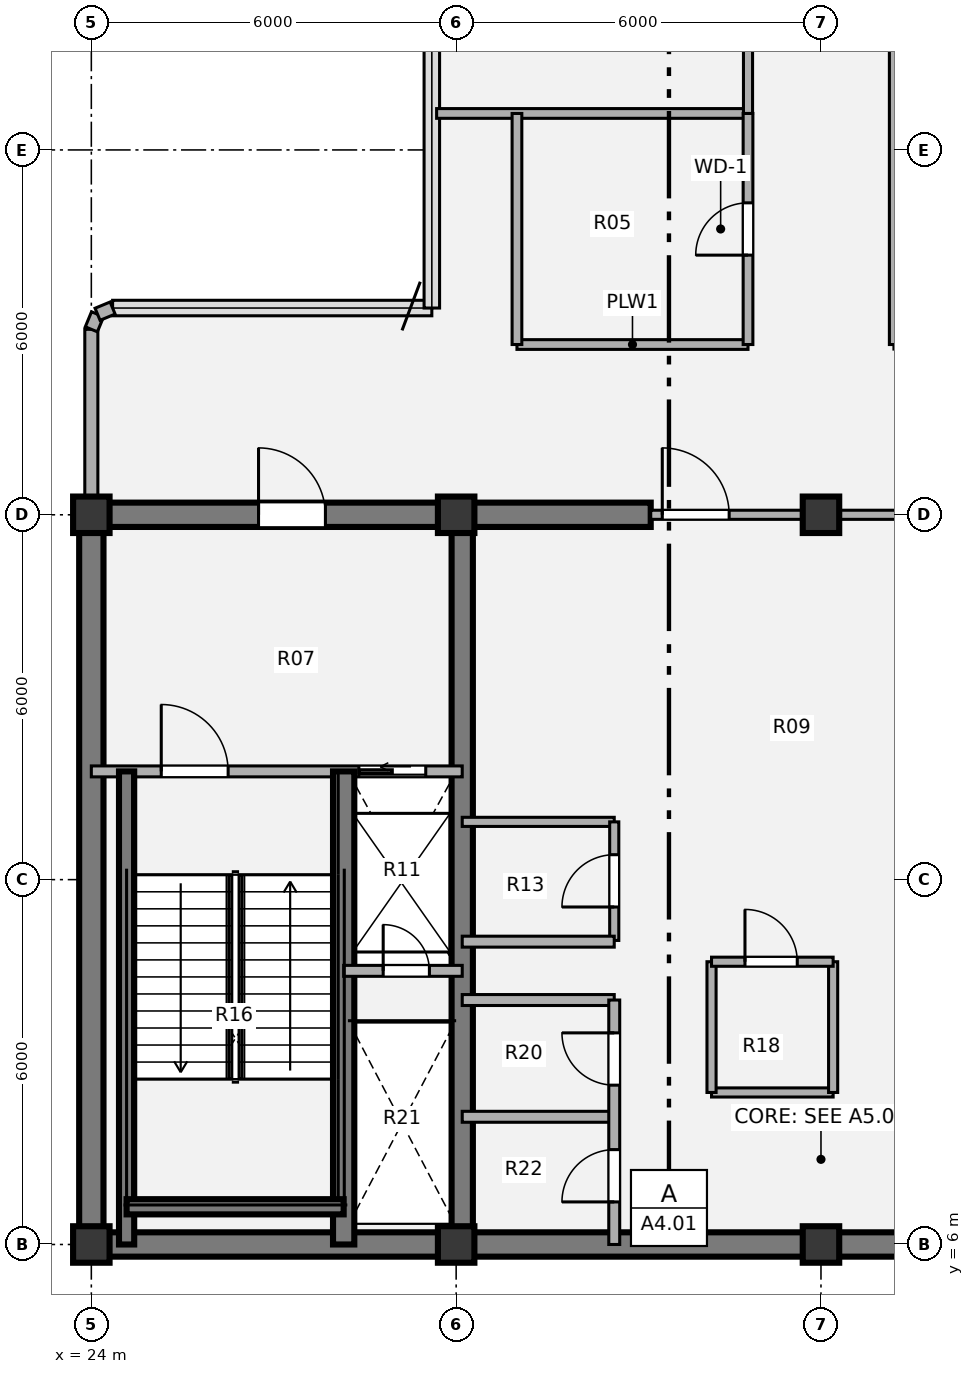
"""IFC4 building model, lengths in metres.
Left out: names, types, materials, properties, quantities, classifications, styles, units other than length and angle.
Written with IfcOpenShell. Run it as: python <this file> out.ifc"""

import sys

from ifc_helpers import new_model, si_unit, direction, frame, frame_2d, origin, origin_2d, place, context, subcontext, project, spatial, rectangle, extrude, source, transform, mapped, element, fill, save


model = new_model("IFC4")
c1 = context("Model", 3, precision=1e-05, world=origin(), true_north=direction((0.0, 1.0)))
c2 = subcontext(c1, "Body", "Model", "MODEL_VIEW")
j1 = project(units=[si_unit("LENGTHUNIT", "METRE"), si_unit("PLANEANGLEUNIT", "RADIAN")], contexts=[c1])
p1 = place(None, origin())
s1 = spatial("IfcSite", under=j1, at=p1, CompositionType="ELEMENT")
p2 = place(p1, origin())
s2 = spatial("IfcBuilding", under=s1, at=p2, CompositionType="ELEMENT")
p3 = place(p2, frame((0.0, 0.0, 291.06)))
s3 = spatial("IfcBuildingStorey", under=s2, at=p3, CompositionType="ELEMENT", Elevation=291.06)
m1 = source(origin(), c2, "Body", "SweptSolid", [
    extrude(rectangle(XDim=0.6, YDim=0.6, at=origin_2d()), origin(), (0.0, 0.0, 1.0), 4.86),
])
for number, where, z_axis, x_axis in (
    (1, (24.0, 6.0, 0.0), (0.0, 0.0, 1.0), (1.0, 0.0, 0.0)),
    (2, (30.0, 6.0, 0.0), (0.0, 0.0, 1.0), (1.0, 0.0, 0.0)),
    (3, (36.0, 6.0, 0.0), (0.0, 0.0, 1.0), (1.0, 0.0, 0.0)),
    (4, (24.0, 18.0, 0.0), (0.0, 0.0, 1.0), (1.0, 0.0, 0.0)),
    (5, (30.0, 18.0, 0.0), (0.0, 0.0, 1.0), (1.0, 0.0, 0.0)),
    (6, (36.0, 18.0, 0.0), (0.0, 0.0, 1.0), (1.0, 0.0, 0.0)),
):
    element("IfcColumn", number, at=place(p3, frame(where, z_axis=z_axis, x_axis=x_axis)), inside=s3, PredefinedType="COLUMN", context=c2, shape_type="MappedRepresentation", body=[
        mapped(m1, transform((0.0, 0.0, 0.0), x_axis=(1.0, 0.0, 0.0), y_axis=(0.0, 1.0, 0.0), z_axis=(0.0, 0.0, 1.0), scale=1.0)),
    ])
p4 = place(p3, frame((48.2, 6.0, 0.0), z_axis=(0.0, 0.0, 1.0), x_axis=(-1.0, 0.0, 0.0)))
e7 = element("IfcWall", 7, at=p4, inside=s3, PredefinedType="SHEAR", context=c2, shape_type="SweptSolid", body=[
    extrude(rectangle(XDim=24.4, YDim=0.4, at=frame_2d((12.2, 0.0))), origin(), (0.0, 0.0, 1.0), 4.86),
])
p5 = place(p3, frame((24.0, 6.0, 0.0), z_axis=(0.0, 0.0, 1.0), x_axis=(0.0, 1.0, 0.0)))
e8 = element("IfcWall", 8, at=p5, inside=s3, PredefinedType="SHEAR", context=c2, shape_type="SweptSolid", body=[
    extrude(rectangle(XDim=12.0, YDim=0.4, at=frame_2d((6.0, 0.0))), origin(), (0.0, 0.0, 1.0), 4.86),
])
p6 = place(p3, frame((23.8, 18.0, 0.0), z_axis=(0.0, 0.0, 1.0), x_axis=(1.0, 0.0, 0.0)))
e9 = element("IfcWall", 9, at=p6, inside=s3, PredefinedType="SHEAR", context=c2, shape_type="SweptSolid", body=[
    extrude(rectangle(XDim=9.4, YDim=0.4, at=frame_2d((4.7, 0.0))), origin(), (0.0, 0.0, 1.0), 4.86),
])
p7 = place(p6, frame((2.95, 0.0, 0.0)))
e10 = element("IfcOpeningElement", 10, at=p7, cuts=e9, PredefinedType="OPENING", context=c2, shape_type="SweptSolid", body=[
    extrude(rectangle(XDim=1.1, YDim=2.1, at=origin_2d()), frame((0.55, 0.21, 1.05), z_axis=(0.0, -1.0, 0.0), x_axis=(1.0, 0.0, 0.0)), (0.0, 0.0, 1.0), 0.42),
])
p8 = place(p3, frame((30.1, 6.0, 0.0), z_axis=(0.0, 0.0, 1.0), x_axis=(0.0, 1.0, 0.0)))
e11 = element("IfcWall", 11, at=p8, inside=s3, PredefinedType="SHEAR", context=c2, shape_type="SweptSolid", body=[
    extrude(rectangle(XDim=12.0, YDim=0.35, at=frame_2d((6.0, 0.0))), origin(), (0.0, 0.0, 1.0), 4.86),
])
p9 = place(p3, frame((24.0, 18.28, 0.0), z_axis=(0.0, 0.0, 1.0), x_axis=(0.0, 1.0, 0.0)))
e12 = element("IfcWall", 12, at=p9, inside=s3, PredefinedType="SOLIDWALL", context=c2, shape_type="SweptSolid", body=[
    extrude(rectangle(XDim=2.77, YDim=0.215, at=frame_2d((1.385, 0.0))), origin(), (0.0, 0.0, 1.0), 2.798),
])
p10 = place(p3, frame((24.0, 21.05, 0.0), z_axis=(0.0, 0.0, 1.0), x_axis=(0.382673670509, 0.923883575944, 0.0)))
e13 = element("IfcWall", 13, at=p10, inside=s3, PredefinedType="SOLIDWALL", context=c2, shape_type="SweptSolid", body=[
    extrude(rectangle(XDim=0.268, YDim=0.215, at=frame_2d((0.134, 0.0))), origin(), (0.0, 0.0, 1.0), 4.61),
])
p11 = place(p3, frame((24.103, 21.298, 0.0), z_axis=(0.0, 0.0, 1.0), x_axis=(0.924205486139, 0.381895560841, 0.0)))
e14 = element("IfcWall", 14, at=p11, inside=s3, PredefinedType="SOLIDWALL", context=c2, shape_type="SweptSolid", body=[
    extrude(rectangle(XDim=0.268, YDim=0.215, at=frame_2d((0.134, 0.0))), origin(), (0.0, 0.0, 1.0), 4.61),
])
p12 = place(p3, frame((30.1, 12.95, 0.0), z_axis=(0.0, 0.0, 1.0), x_axis=(1.0, 0.0, 0.0)))
e15 = element("IfcWall", 15, at=p12, inside=s3, PredefinedType="PARTITIONING", context=c2, shape_type="SweptSolid", body=[
    extrude(rectangle(XDim=2.5, YDim=0.15, at=frame_2d((1.25, 0.0))), origin(), (0.0, 0.0, 1.0), 4.58),
])
p13 = place(p3, frame((32.6, 11.0, 0.0), z_axis=(0.0, 0.0, 1.0), x_axis=(0.0, 1.0, 0.0)))
e16 = element("IfcWall", 16, at=p13, inside=s3, PredefinedType="PARTITIONING", context=c2, shape_type="SweptSolid", body=[
    extrude(rectangle(XDim=1.95, YDim=0.15, at=frame_2d((0.975, 0.0))), origin(), (0.0, 0.0, 1.0), 4.58),
])
p14 = place(p13, frame((0.55, 0.0, 0.0)))
e17 = element("IfcOpeningElement", 17, at=p14, cuts=e16, PredefinedType="OPENING", context=c2, shape_type="SweptSolid", body=[
    extrude(rectangle(XDim=0.86, YDim=2.1, at=origin_2d()), frame((0.43, 0.085, 1.05), z_axis=(0.0, -1.0, 0.0), x_axis=(1.0, 0.0, 0.0)), (0.0, 0.0, 1.0), 0.17),
])
p15 = place(p3, frame((34.2, 8.5, 0.0), z_axis=(0.0, 0.0, 1.0), x_axis=(1.0, 0.0, 0.0)))
e18 = element("IfcWall", 18, at=p15, inside=s3, PredefinedType="PARTITIONING", context=c2, shape_type="SweptSolid", body=[
    extrude(rectangle(XDim=2.0, YDim=0.15, at=frame_2d((1.0, 0.0))), origin(), (0.0, 0.0, 1.0), 4.58),
])
p16 = place(p3, frame((34.2, 8.5, 0.0), z_axis=(0.0, 0.0, 1.0), x_axis=(0.0, 1.0, 0.0)))
e19 = element("IfcWall", 19, at=p16, inside=s3, PredefinedType="PARTITIONING", context=c2, shape_type="SweptSolid", body=[
    extrude(rectangle(XDim=2.15, YDim=0.15, at=frame_2d((1.075, 0.0))), origin(), (0.0, 0.0, 1.0), 4.58),
])
p17 = place(p3, frame((36.2, 8.5, 0.0), z_axis=(0.0, 0.0, 1.0), x_axis=(0.0, 1.0, 0.0)))
e20 = element("IfcWall", 20, at=p17, inside=s3, PredefinedType="PARTITIONING", context=c2, shape_type="SweptSolid", body=[
    extrude(rectangle(XDim=2.15, YDim=0.15, at=frame_2d((1.075, 0.0))), origin(), (0.0, 0.0, 1.0), 3.795),
])
p18 = place(p3, frame((34.2, 10.65, 0.0), z_axis=(0.0, 0.0, 1.0), x_axis=(1.0, 0.0, 0.0)))
e21 = element("IfcWall", 21, at=p18, inside=s3, PredefinedType="PARTITIONING", context=c2, shape_type="SweptSolid", body=[
    extrude(rectangle(XDim=2.0, YDim=0.15, at=frame_2d((1.0, 0.0))), origin(), (0.0, 0.0, 1.0), 4.58),
])
p19 = place(p18, frame((0.55, 0.0, 0.0)))
e22 = element("IfcOpeningElement", 22, at=p19, cuts=e21, PredefinedType="OPENING", context=c2, shape_type="SweptSolid", body=[
    extrude(rectangle(XDim=0.86, YDim=2.1, at=origin_2d()), frame((0.43, 0.085, 1.05), z_axis=(0.0, -1.0, 0.0), x_axis=(1.0, 0.0, 0.0)), (0.0, 0.0, 1.0), 0.17),
])
for number, where, z_axis, x_axis in (
    (23, (30.1, 10.98, 0.0), (0.0, 0.0, 1.0), (1.0, 0.0, 0.0)),
    (24, (30.1, 8.1, 0.0), (0.0, 0.0, 1.0), (1.0, 0.0, 0.0)),
    (25, (30.1, 10.02, 0.0), (0.0, 0.0, 1.0), (1.0, 0.0, 0.0)),
):
    element("IfcWall", number, at=place(p3, frame(where, z_axis=z_axis, x_axis=x_axis)), inside=s3, PredefinedType="PARTITIONING", context=c2, shape_type="SweptSolid", body=[
        extrude(rectangle(XDim=2.5, YDim=0.18, at=frame_2d((1.25, 0.0))), origin(), (0.0, 0.0, 1.0), 4.58),
    ])
p20 = place(p3, frame((32.6, 6.0, 0.0), z_axis=(0.0, 0.0, 1.0), x_axis=(0.0, 1.0, 0.0)))
e26 = element("IfcWall", 26, at=p20, inside=s3, PredefinedType="PARTITIONING", context=c2, shape_type="SweptSolid", body=[
    extrude(rectangle(XDim=4.02, YDim=0.18, at=frame_2d((2.01, 0.0))), origin(), (0.0, 0.0, 1.0), 4.58),
])
p21 = place(p20, frame((0.7, 0.0, 0.0)))
e27 = element("IfcOpeningElement", 27, at=p21, cuts=e26, PredefinedType="OPENING", context=c2, shape_type="SweptSolid", body=[
    extrude(rectangle(XDim=0.86, YDim=2.1, at=origin_2d()), frame((0.43, 0.1, 1.05), z_axis=(0.0, -1.0, 0.0), x_axis=(1.0, 0.0, 0.0)), (0.0, 0.0, 1.0), 0.2),
])
p22 = place(p20, frame((2.62, 0.0, 0.0)))
e28 = element("IfcOpeningElement", 28, at=p22, cuts=e26, PredefinedType="OPENING", context=c2, shape_type="SweptSolid", body=[
    extrude(rectangle(XDim=0.86, YDim=2.1, at=origin_2d()), frame((0.43, 0.1, 1.05), z_axis=(0.0, -1.0, 0.0), x_axis=(1.0, 0.0, 0.0)), (0.0, 0.0, 1.0), 0.2),
])
p23 = place(p3, frame((33.2, 18.0, 0.0), z_axis=(0.0, 0.0, 1.0), x_axis=(1.0, 0.0, 0.0)))
e29 = element("IfcWall", 29, at=p23, inside=s3, PredefinedType="PARTITIONING", context=c2, shape_type="SweptSolid", body=[
    extrude(rectangle(XDim=5.6, YDim=0.15, at=frame_2d((2.8, 0.0))), origin(), (0.0, 0.0, 1.0), 3.595),
])
p24 = place(p23, frame((0.19, 0.0, 0.0)))
e30 = element("IfcOpeningElement", 30, at=p24, cuts=e29, PredefinedType="OPENING", context=c2, shape_type="SweptSolid", body=[
    extrude(rectangle(XDim=1.1, YDim=2.1, at=origin_2d()), frame((0.55, 0.085, 1.05), z_axis=(0.0, -1.0, 0.0), x_axis=(1.0, 0.0, 0.0)), (0.0, 0.0, 1.0), 0.17),
])
p25 = place(p23, frame((4.31, 0.0, 0.0)))
e31 = element("IfcOpeningElement", 31, at=p25, cuts=e29, PredefinedType="OPENING", context=c2, shape_type="SweptSolid", body=[
    extrude(rectangle(XDim=1.1, YDim=2.1, at=origin_2d()), frame((0.55, 0.085, 1.05), z_axis=(0.0, -1.0, 0.0), x_axis=(1.0, 0.0, 0.0)), (0.0, 0.0, 1.0), 0.17),
])
p26 = place(p3, frame((24.0, 13.78, 0.0), z_axis=(0.0, 0.0, 1.0), x_axis=(1.0, 0.0, 0.0)))
e32 = element("IfcWall", 32, at=p26, inside=s3, PredefinedType="PARTITIONING", context=c2, shape_type="SweptSolid", body=[
    extrude(rectangle(XDim=6.1, YDim=0.18, at=frame_2d((3.05, 0.0))), origin(), (0.0, 0.0, 1.0), 4.58),
])
p27 = place(p26, frame((1.15, 0.0, 0.0)))
e33 = element("IfcOpeningElement", 33, at=p27, cuts=e32, PredefinedType="OPENING", context=c2, shape_type="SweptSolid", body=[
    extrude(rectangle(XDim=1.1, YDim=2.1, at=origin_2d()), frame((0.55, 0.1, 1.05), z_axis=(0.0, -1.0, 0.0), x_axis=(1.0, 0.0, 0.0)), (0.0, 0.0, 1.0), 0.2),
])
p28 = place(p26, frame((4.4, 0.0, 0.0)))
e34 = element("IfcOpeningElement", 34, at=p28, cuts=e32, PredefinedType="OPENING", context=c2, shape_type="SweptSolid", body=[
    extrude(rectangle(XDim=1.1, YDim=2.1, at=origin_2d()), frame((0.55, 0.1, 1.05), z_axis=(0.0, -1.0, 0.0), x_axis=(1.0, 0.0, 0.0)), (0.0, 0.0, 1.0), 0.2),
])
p29 = place(p3, frame((28.15, 6.0, 0.0), z_axis=(0.0, 0.0, 1.0), x_axis=(0.0, 1.0, 0.0)))
e35 = element("IfcWall", 35, at=p29, inside=s3, PredefinedType="SHEAR", context=c2, shape_type="SweptSolid", body=[
    extrude(rectangle(XDim=7.78, YDim=0.35, at=frame_2d((3.89, 0.0))), origin(), (0.0, 0.0, 1.0), 4.93),
])
p30 = place(p3, frame((24.58, 6.0, 0.0), z_axis=(0.0, 0.0, 1.0), x_axis=(0.0, 1.0, 0.0)))
e36 = element("IfcWall", 36, at=p30, inside=s3, PredefinedType="SHEAR", context=c2, shape_type="SweptSolid", body=[
    extrude(rectangle(XDim=7.78, YDim=0.25, at=frame_2d((3.89, 0.0))), origin(), (0.0, 0.0, 1.0), 4.93),
])
p31 = place(p3, frame((24.58, 6.62, 0.0), z_axis=(0.0, 0.0, 1.0), x_axis=(1.0, 0.0, 0.0)))
e37 = element("IfcWall", 37, at=p31, inside=s3, PredefinedType="SHEAR", context=c2, shape_type="SweptSolid", body=[
    extrude(rectangle(XDim=3.57, YDim=0.25, at=frame_2d((1.785, 0.0))), origin(), (0.0, 0.0, 1.0), 4.93),
])
p32 = place(p3, frame((28.15, 10.5, 0.0), z_axis=(0.0, 0.0, 1.0), x_axis=(1.0, 0.0, 0.0)))
e38 = element("IfcWall", 38, at=p32, inside=s3, PredefinedType="PARTITIONING", context=c2, shape_type="SweptSolid", body=[
    extrude(rectangle(XDim=1.95, YDim=0.18, at=frame_2d((0.975, 0.0))), origin(), (0.0, 0.0, 1.0), 4.58),
])
p33 = place(p32, frame((0.65, 0.0, 0.0)))
e39 = element("IfcOpeningElement", 39, at=p33, cuts=e38, PredefinedType="OPENING", context=c2, shape_type="SweptSolid", body=[
    extrude(rectangle(XDim=0.76, YDim=2.05, at=origin_2d()), frame((0.38, 0.1, 1.025), z_axis=(0.0, -1.0, 0.0), x_axis=(1.0, 0.0, 0.0)), (0.0, 0.0, 1.0), 0.2),
])
p34 = place(p3, frame((31.0, 20.8, 0.0), z_axis=(0.0, 0.0, 1.0), x_axis=(1.0, 0.0, 0.0)))
e40 = element("IfcWall", 40, at=p34, inside=s3, PredefinedType="PLUMBINGWALL", context=c2, shape_type="SweptSolid", body=[
    extrude(rectangle(XDim=3.8, YDim=0.16, at=frame_2d((1.9, 0.0))), origin(), (0.0, 0.0, 1.0), 4.58),
])
p35 = place(p3, frame((29.679, 24.6, 0.0), z_axis=(0.0, 0.0, 1.0), x_axis=(1.0, 0.0, 0.0)))
e41 = element("IfcWall", 41, at=p35, inside=s3, PredefinedType="PLUMBINGWALL", context=c2, shape_type="SweptSolid", body=[
    extrude(rectangle(XDim=5.121, YDim=0.16, at=frame_2d((2.561, 0.0))), origin(), (0.0, 0.0, 1.0), 4.58),
])
p36 = place(p3, frame((31.0, 20.8, 0.0), z_axis=(0.0, 0.0, 1.0), x_axis=(0.0, 1.0, 0.0)))
e42 = element("IfcWall", 42, at=p36, inside=s3, PredefinedType="PLUMBINGWALL", context=c2, shape_type="SweptSolid", body=[
    extrude(rectangle(XDim=3.8, YDim=0.16, at=frame_2d((1.9, 0.0))), origin(), (0.0, 0.0, 1.0), 4.58),
])
p37 = place(p3, frame((34.8, 20.8, 0.0), z_axis=(0.0, 0.0, 1.0), x_axis=(0.0, 1.0, 0.0)))
e43 = element("IfcWall", 43, at=p37, inside=s3, PredefinedType="PLUMBINGWALL", context=c2, shape_type="SweptSolid", body=[
    extrude(rectangle(XDim=3.8, YDim=0.16, at=frame_2d((1.9, 0.0))), origin(), (0.0, 0.0, 1.0), 4.58),
])
p38 = place(p37, frame((1.47, 0.0, 0.0)))
e44 = element("IfcOpeningElement", 44, at=p38, cuts=e43, PredefinedType="OPENING", context=c2, shape_type="SweptSolid", body=[
    extrude(rectangle(XDim=0.86, YDim=2.1, at=origin_2d()), frame((0.43, 0.09, 1.05), z_axis=(0.0, -1.0, 0.0), x_axis=(1.0, 0.0, 0.0)), (0.0, 0.0, 1.0), 0.18),
])
p39 = place(p3, frame((34.8, 24.6, 0.0), z_axis=(0.0, 0.0, 1.0), x_axis=(0.0, 1.0, 0.0)))
e45 = element("IfcWall", 45, at=p39, inside=s3, PredefinedType="PARTITIONING", context=c2, shape_type="SweptSolid", body=[
    extrude(rectangle(XDim=17.4, YDim=0.15, at=frame_2d((8.7, 0.0))), origin(), (0.0, 0.0, 1.0), 4.58),
])
p40 = place(p39, frame((9.625, 0.0, 0.0)))
e46 = element("IfcOpeningElement", 46, at=p40, cuts=e45, PredefinedType="OPENING", context=c2, shape_type="SweptSolid", body=[
    extrude(rectangle(XDim=1.05, YDim=2.1, at=origin_2d()), frame((0.525, 0.085, 1.05), z_axis=(0.0, -1.0, 0.0), x_axis=(1.0, 0.0, 0.0)), (0.0, 0.0, 1.0), 0.17),
])
p41 = place(p3, frame((37.2, 20.8, 0.0), z_axis=(0.0, 0.0, 1.0), x_axis=(0.0, 1.0, 0.0)))
e47 = element("IfcWall", 47, at=p41, inside=s3, PredefinedType="PARTITIONING", context=c2, shape_type="SweptSolid", body=[
    extrude(rectangle(XDim=21.2, YDim=0.15, at=frame_2d((10.6, 0.0))), origin(), (0.0, 0.0, 1.0), 4.58),
])
p42 = place(p41, frame((10.425, 0.0, 0.0)))
e48 = element("IfcOpeningElement", 48, at=p42, cuts=e47, PredefinedType="OPENING", context=c2, shape_type="SweptSolid", body=[
    extrude(rectangle(XDim=1.05, YDim=2.1, at=origin_2d()), frame((0.525, 0.085, 1.05), z_axis=(0.0, -1.0, 0.0), x_axis=(1.0, 0.0, 0.0)), (0.0, 0.0, 1.0), 0.17),
])
m2 = source(origin(), c2, "Body", "SweptSolid", [
    extrude(rectangle(XDim=0.86, YDim=2.1, at=origin_2d()), frame((0.43, 0.025, 1.05), z_axis=(0.0, -1.0, 0.0), x_axis=(1.0, 0.0, 0.0)), (0.0, 0.0, 1.0), 0.05),
])
p43 = place(p14, origin())
e49 = element("IfcDoor", 49, at=p43, inside=s3, OperationType="SINGLE_SWING_LEFT", PredefinedType="DOOR", context=c2, shape_type="MappedRepresentation", body=[
    mapped(m2, transform((0.0, 0.0, 0.0), x_axis=(1.0, 0.0, 0.0), y_axis=(0.0, 1.0, 0.0), z_axis=(0.0, 0.0, 1.0), scale=1.0)),
])
fill(e17, e49)
p44 = place(p19, origin())
e50 = element("IfcDoor", 50, at=p44, inside=s3, OperationType="SINGLE_SWING_LEFT", PredefinedType="DOOR", context=c2, shape_type="MappedRepresentation", body=[
    mapped(m2, transform((0.0, 0.0, 0.0), x_axis=(1.0, 0.0, 0.0), y_axis=(0.0, 1.0, 0.0), z_axis=(0.0, 0.0, 1.0), scale=1.0)),
])
fill(e22, e50)
p45 = place(p21, origin())
e51 = element("IfcDoor", 51, at=p45, inside=s3, OperationType="SINGLE_SWING_LEFT", PredefinedType="DOOR", context=c2, shape_type="MappedRepresentation", body=[
    mapped(m2, transform((0.0, 0.0, 0.0), x_axis=(1.0, 0.0, 0.0), y_axis=(0.0, 1.0, 0.0), z_axis=(0.0, 0.0, 1.0), scale=1.0)),
])
fill(e27, e51)
p46 = place(p22, origin())
e52 = element("IfcDoor", 52, at=p46, inside=s3, OperationType="SINGLE_SWING_RIGHT", PredefinedType="DOOR", context=c2, shape_type="MappedRepresentation", body=[
    mapped(m2, transform((0.0, 0.0, 0.0), x_axis=(1.0, 0.0, 0.0), y_axis=(0.0, 1.0, 0.0), z_axis=(0.0, 0.0, 1.0), scale=1.0)),
])
fill(e28, e52)
m3 = source(origin(), c2, "Body", "SweptSolid", [
    extrude(rectangle(XDim=1.1, YDim=2.1, at=origin_2d()), frame((0.55, 0.025, 1.05), z_axis=(0.0, -1.0, 0.0), x_axis=(1.0, 0.0, 0.0)), (0.0, 0.0, 1.0), 0.05),
])
p47 = place(p24, origin())
e53 = element("IfcDoor", 53, at=p47, inside=s3, OperationType="SINGLE_SWING_LEFT", PredefinedType="DOOR", context=c2, shape_type="MappedRepresentation", body=[
    mapped(m3, transform((0.0, 0.0, 0.0), x_axis=(1.0, 0.0, 0.0), y_axis=(0.0, 1.0, 0.0), z_axis=(0.0, 0.0, 1.0), scale=1.0)),
])
fill(e30, e53)
m4 = source(origin(), c2, "Body", "SweptSolid", [
    extrude(rectangle(XDim=1.1, YDim=2.1, at=origin_2d()), frame((0.55, 0.025, 1.05), z_axis=(0.0, -1.0, 0.0), x_axis=(1.0, 0.0, 0.0)), (0.0, 0.0, 1.0), 0.05),
])
p48 = place(p27, origin())
e54 = element("IfcDoor", 54, at=p48, inside=s3, OperationType="SINGLE_SWING_LEFT", PredefinedType="DOOR", context=c2, shape_type="MappedRepresentation", body=[
    mapped(m4, transform((0.0, 0.0, 0.0), x_axis=(1.0, 0.0, 0.0), y_axis=(0.0, 1.0, 0.0), z_axis=(0.0, 0.0, 1.0), scale=1.0)),
])
fill(e33, e54)
m5 = source(origin(), c2, "Body", "SweptSolid", [
    extrude(rectangle(XDim=1.1, YDim=2.1, at=origin_2d()), frame((0.55, 0.025, 1.05), z_axis=(0.0, -1.0, 0.0), x_axis=(1.0, 0.0, 0.0)), (0.0, 0.0, 1.0), 0.05),
])
p49 = place(p28, origin())
e55 = element("IfcDoor", 55, at=p49, inside=s3, OperationType="SLIDING_TO_LEFT", PredefinedType="DOOR", context=c2, shape_type="MappedRepresentation", body=[
    mapped(m5, transform((0.0, 0.0, 0.0), x_axis=(1.0, 0.0, 0.0), y_axis=(0.0, 1.0, 0.0), z_axis=(0.0, 0.0, 1.0), scale=1.0)),
])
fill(e34, e55)
m6 = source(origin(), c2, "Body", "SweptSolid", [
    extrude(rectangle(XDim=0.76, YDim=2.05, at=origin_2d()), frame((0.38, 0.025, 1.025), z_axis=(0.0, -1.0, 0.0), x_axis=(1.0, 0.0, 0.0)), (0.0, 0.0, 1.0), 0.05),
])
p50 = place(p33, origin())
e56 = element("IfcDoor", 56, at=p50, inside=s3, OperationType="SINGLE_SWING_LEFT", PredefinedType="DOOR", context=c2, shape_type="MappedRepresentation", body=[
    mapped(m6, transform((0.0, 0.0, 0.0), x_axis=(1.0, 0.0, 0.0), y_axis=(0.0, 1.0, 0.0), z_axis=(0.0, 0.0, 1.0), scale=1.0)),
])
fill(e39, e56)
p51 = place(p7, origin())
e57 = element("IfcDoor", 57, at=p51, inside=s3, OperationType="SINGLE_SWING_LEFT", PredefinedType="DOOR", context=c2, shape_type="MappedRepresentation", body=[
    mapped(m3, transform((0.0, 0.0, 0.0), x_axis=(1.0, 0.0, 0.0), y_axis=(0.0, 1.0, 0.0), z_axis=(0.0, 0.0, 1.0), scale=1.0)),
])
fill(e10, e57)
m7 = source(origin(), c2, "Body", "SweptSolid", [
    extrude(rectangle(XDim=0.86, YDim=2.1, at=origin_2d()), frame((0.43, 0.025, 1.05), z_axis=(0.0, -1.0, 0.0), x_axis=(1.0, 0.0, 0.0)), (0.0, 0.0, 1.0), 0.05),
])
p52 = place(p38, origin())
e58 = element("IfcDoor", 58, at=p52, inside=s3, OperationType="SINGLE_SWING_LEFT", PredefinedType="DOOR", context=c2, shape_type="MappedRepresentation", body=[
    mapped(m7, transform((0.0, 0.0, 0.0), x_axis=(1.0, 0.0, 0.0), y_axis=(0.0, 1.0, 0.0), z_axis=(0.0, 0.0, 1.0), scale=1.0)),
])
fill(e44, e58)
save(model, sys.argv[1])
